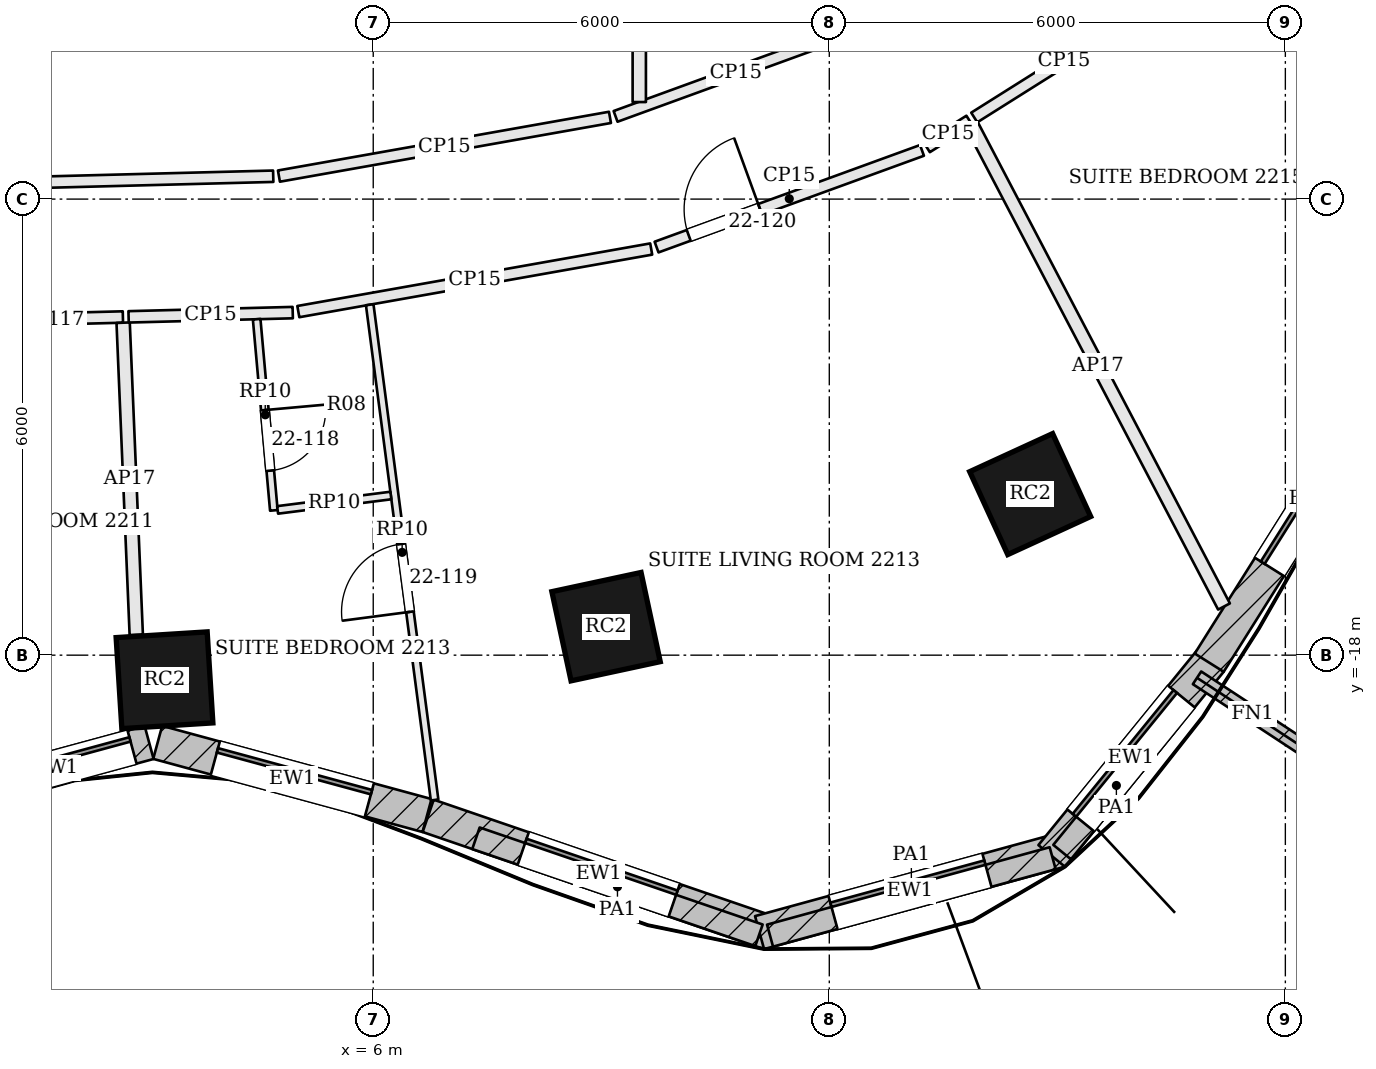
"""IFC4 building model, lengths in metres.
Left out: names, types, materials, properties, quantities, classifications, styles, units other than length and angle.
Written with IfcOpenShell. Run it as: python <this file> out.ifc"""

import sys

from ifc_helpers import new_model, si_unit, direction, frame, frame_2d, origin, origin_2d, place, context, subcontext, project, spatial, rectangle, extrude, element, fill, save


model = new_model("IFC4")
c1 = context("Model", 3, precision=1e-05, world=origin(), true_north=direction((0.0, 1.0)))
c2 = subcontext(c1, "Body", "Model", "MODEL_VIEW")
j1 = project(units=[si_unit("LENGTHUNIT", "METRE"), si_unit("PLANEANGLEUNIT", "RADIAN")], contexts=[c1])
p1 = place(None, origin())
s1 = spatial("IfcSite", under=j1, at=p1, CompositionType="ELEMENT")
p2 = place(p1, origin())
s2 = spatial("IfcBuilding", under=s1, at=p2, CompositionType="ELEMENT")
p3 = place(p2, frame((0.0, 0.0, 96.0)))
s3 = spatial("IfcBuildingStorey", under=s2, at=p3, CompositionType="ELEMENT", Elevation=96.0)
for number, where, z_axis, x_axis in (
    (1, (3.254, -18.33, 0.0), (0.0, 0.0, 1.0), (0.998, 0.063, 0.0)),
    (2, (9.063, -17.625, 0.0), (0.0, 0.0, 1.0), (0.978, 0.21, 0.0)),
    (3, (14.643, -15.881, 0.0), (0.0, 0.0, 1.0), (0.909, 0.417, 0.0)),
):
    element("IfcColumn", number, at=place(p3, frame(where, z_axis=z_axis, x_axis=x_axis)), inside=s3, PredefinedType="COLUMN", context=c2, shape_type="SweptSolid", body=[
        extrude(rectangle(XDim=1.2, YDim=1.2, at=origin_2d()), origin(), (0.0, 0.0, 1.0), 3.6),
    ])
p4 = place(p3, frame((0.576, -19.821, 0.0), z_axis=(0.0, 0.0, 1.0), x_axis=(0.965009398019, 0.262215296532, 0.0)))
e4 = element("IfcWall", 4, at=p4, inside=s3, PredefinedType="SOLIDWALL", context=c2, shape_type="SweptSolid", body=[
    extrude(rectangle(XDim=2.565, YDim=0.45, at=frame_2d((1.283, 0.0))), origin(), (0.0, 0.0, 1.0), 3.4),
])
p5 = place(p4, frame((0.233, 0.0, 0.9)))
e5 = element("IfcOpeningElement", 5, at=p5, cuts=e4, PredefinedType="OPENING", context=c2, shape_type="SweptSolid", body=[
    extrude(rectangle(XDim=2.1, YDim=2.0, at=frame_2d((1.05, 1.0))), frame((0.0, 0.235, 0.0), z_axis=(0.0, -1.0, 0.0), x_axis=(1.0, 0.0, 0.0)), (0.0, 0.0, 1.0), 0.47),
])
p6 = place(p3, frame((3.164, -19.147, 0.0), z_axis=(0.0, 0.0, 1.0), x_axis=(0.965039479998, -0.262104563191, 0.0)))
e6 = element("IfcWall", 6, at=p6, inside=s3, PredefinedType="SOLIDWALL", context=c2, shape_type="SweptSolid", body=[
    extrude(rectangle(XDim=3.672, YDim=0.45, at=frame_2d((1.836, 0.0))), origin(), (0.0, 0.0, 1.0), 3.4),
])
p7 = place(p6, frame((0.786, 0.0, 0.9)))
e7 = element("IfcOpeningElement", 7, at=p7, cuts=e6, PredefinedType="OPENING", context=c2, shape_type="SweptSolid", body=[
    extrude(rectangle(XDim=2.1, YDim=2.0, at=frame_2d((1.05, 1.0))), frame((0.0, 0.235, 0.0), z_axis=(0.0, -1.0, 0.0), x_axis=(1.0, 0.0, 0.0)), (0.0, 0.0, 1.0), 0.47),
])
p8 = place(p3, frame((6.723, -20.114, 0.0), z_axis=(0.0, 0.0, 1.0), x_axis=(0.945947299026, -0.324320377815, 0.0)))
e8 = element("IfcWall", 8, at=p8, inside=s3, PredefinedType="SOLIDWALL", context=c2, shape_type="SweptSolid", body=[
    extrude(rectangle(XDim=4.745, YDim=0.45, at=frame_2d((2.372, 0.0))), origin(), (0.0, 0.0, 1.0), 3.4),
])
p9 = place(p8, frame((1.322, 0.0, 0.9)))
e9 = element("IfcOpeningElement", 9, at=p9, cuts=e8, PredefinedType="OPENING", context=c2, shape_type="SweptSolid", body=[
    extrude(rectangle(XDim=2.1, YDim=2.0, at=frame_2d((1.05, 1.0))), frame((0.0, 0.235, 0.0), z_axis=(0.0, -1.0, 0.0), x_axis=(1.0, 0.0, 0.0)), (0.0, 0.0, 1.0), 0.47),
])
p10 = place(p3, frame((11.083, -21.65, 0.0), z_axis=(0.0, 0.0, 1.0), x_axis=(0.964483204983, 0.264144179011, 0.0)))
e10 = element("IfcWall", 10, at=p10, inside=s3, PredefinedType="SOLIDWALL", context=c2, shape_type="SweptSolid", body=[
    extrude(rectangle(XDim=4.104, YDim=0.45, at=frame_2d((2.052, 0.0))), origin(), (0.0, 0.0, 1.0), 3.4),
])
p11 = place(p10, frame((1.002, 0.0, 0.9)))
e11 = element("IfcOpeningElement", 11, at=p11, cuts=e10, PredefinedType="OPENING", context=c2, shape_type="SweptSolid", body=[
    extrude(rectangle(XDim=2.1, YDim=2.0, at=frame_2d((1.05, 1.0))), frame((0.0, 0.235, 0.0), z_axis=(0.0, -1.0, 0.0), x_axis=(1.0, 0.0, 0.0)), (0.0, 0.0, 1.0), 0.47),
])
p12 = place(p3, frame((14.926, -20.641, 0.0), z_axis=(0.0, 0.0, 1.0), x_axis=(0.631548074669, 0.775336720001, 0.0)))
e12 = element("IfcWall", 12, at=p12, inside=s3, PredefinedType="SOLIDWALL", context=c2, shape_type="SweptSolid", body=[
    extrude(rectangle(XDim=3.308, YDim=0.45, at=frame_2d((1.654, 0.0))), origin(), (0.0, 0.0, 1.0), 3.4),
])
p13 = place(p12, frame((0.604, 0.0, 0.9)))
e13 = element("IfcOpeningElement", 13, at=p13, cuts=e12, PredefinedType="OPENING", context=c2, shape_type="SweptSolid", body=[
    extrude(rectangle(XDim=2.1, YDim=2.0, at=frame_2d((1.05, 1.0))), frame((0.0, 0.235, 0.0), z_axis=(0.0, -1.0, 0.0), x_axis=(1.0, 0.0, 0.0)), (0.0, 0.0, 1.0), 0.47),
])
p14 = place(p3, frame((16.998, -18.099, 0.0), z_axis=(0.0, 0.0, 1.0), x_axis=(0.532745661304, 0.846275404559, 0.0)))
e14 = element("IfcWall", 14, at=p14, inside=s3, PredefinedType="SOLIDWALL", context=c2, shape_type="SweptSolid", body=[
    extrude(rectangle(XDim=5.076, YDim=0.45, at=frame_2d((2.538, 0.0))), origin(), (0.0, 0.0, 1.0), 3.4),
])
p15 = place(p14, frame((1.488, 0.0, 0.9)))
e15 = element("IfcOpeningElement", 15, at=p15, cuts=e14, PredefinedType="OPENING", context=c2, shape_type="SweptSolid", body=[
    extrude(rectangle(XDim=2.1, YDim=2.0, at=frame_2d((1.05, 1.0))), frame((0.0, 0.235, 0.0), z_axis=(0.0, -1.0, 0.0), x_axis=(1.0, 0.0, 0.0)), (0.0, 0.0, 1.0), 0.47),
])
p16 = place(p3, frame((16.838, -18.298, 0.0), z_axis=(0.0, 0.0, 1.0), x_axis=(0.835871900419, -0.548924554097, 0.0)))
e16 = element("IfcWall", 16, at=p16, inside=s3, PredefinedType="SOLIDWALL", context=c2, shape_type="SweptSolid", body=[
    extrude(rectangle(XDim=1.75, YDim=0.2, at=frame_2d((0.875, 0.0))), origin(), (0.0, 0.0, 1.0), 3.4),
])
p17 = place(p3, frame((7.352, -20.409, 3.6), z_axis=(0.0, 0.0, 1.0), x_axis=(0.945937789937, -0.32434811171, 0.0)))
e17 = element("IfcWall", 17, at=p17, inside=s3, PredefinedType="PARAPET", context=c2, shape_type="SweptSolid", body=[
    extrude(rectangle(XDim=3.936, YDim=0.3, at=frame_2d((1.968, 0.0))), origin(), (0.0, 0.0, 1.0), 1.1),
])
p18 = place(p3, frame((11.22, -21.69, 3.6), z_axis=(0.0, 0.0, 1.0), x_axis=(0.964484148392, 0.264140734271, 0.0)))
e18 = element("IfcWall", 18, at=p18, inside=s3, PredefinedType="PARAPET", context=c2, shape_type="SweptSolid", body=[
    extrude(rectangle(XDim=3.855, YDim=0.3, at=frame_2d((1.928, 0.0))), origin(), (0.0, 0.0, 1.0), 1.1),
])
p19 = place(p3, frame((15.063, -20.591, 3.6), z_axis=(0.0, 0.0, 1.0), x_axis=(0.631559943447, 0.775327052174, 0.0)))
e19 = element("IfcWall", 19, at=p19, inside=s3, PredefinedType="PARAPET", context=c2, shape_type="SweptSolid", body=[
    extrude(rectangle(XDim=2.26, YDim=0.3, at=frame_2d((1.13, 0.0))), origin(), (0.0, 0.0, 1.0), 1.1),
])
p20 = place(p3, frame((-1.957, -13.672, 0.0), z_axis=(0.0, 0.0, 1.0), x_axis=(0.999664413823, 0.025904820691, 0.0)))
e20 = element("IfcWall", 20, at=p20, inside=s3, PredefinedType="PARTITIONING", context=c2, shape_type="SweptSolid", body=[
    extrude(rectangle(XDim=4.665, YDim=0.15, at=frame_2d((2.333, 0.0))), origin(), (0.0, 0.0, 1.0), 2.784),
])
p21 = place(p20, frame((2.712, 0.0, 0.0)))
e21 = element("IfcOpeningElement", 21, at=p21, cuts=e20, PredefinedType="OPENING", context=c2, shape_type="SweptSolid", body=[
    extrude(rectangle(XDim=1.0, YDim=2.1, at=frame_2d((0.5, 1.05))), frame((0.0, 0.085, 0.0), z_axis=(0.0, -1.0, 0.0), x_axis=(1.0, 0.0, 0.0)), (0.0, 0.0, 1.0), 0.17),
])
p22 = place(p3, frame((2.882, -17.732, 0.0), z_axis=(0.0, 0.0, 1.0), x_axis=(-0.042001196053, 0.999117560415, 0.0)))
e22 = element("IfcWall", 22, at=p22, inside=s3, PredefinedType="PARTITIONING", context=c2, shape_type="SweptSolid", body=[
    extrude(rectangle(XDim=4.11, YDim=0.175, at=frame_2d((2.055, 0.0))), origin(), (0.0, 0.0, 1.0), 2.784),
])
p23 = place(p3, frame((2.781, -13.549, 0.0), z_axis=(0.0, 0.0, 1.0), x_axis=(0.999665013714, 0.025881660615, 0.0)))
e23 = element("IfcWall", 23, at=p23, inside=s3, PredefinedType="PARTITIONING", context=c2, shape_type="SweptSolid", body=[
    extrude(rectangle(XDim=2.16, YDim=0.15, at=frame_2d((1.08, 0.0))), origin(), (0.0, 0.0, 1.0), 2.784),
])
p24 = place(p3, frame((5.015, -13.48, 0.0), z_axis=(0.0, 0.0, 1.0), x_axis=(0.984637772103, 0.174609443467, 0.0)))
e24 = element("IfcWall", 24, at=p24, inside=s3, PredefinedType="PARTITIONING", context=c2, shape_type="SweptSolid", body=[
    extrude(rectangle(XDim=4.715, YDim=0.15, at=frame_2d((2.357, 0.0))), origin(), (0.0, 0.0, 1.0), 2.784),
])
p25 = place(p3, frame((9.728, -12.631, 0.0), z_axis=(0.0, 0.0, 1.0), x_axis=(0.939626438181, 0.342201923826, 0.0)))
e25 = element("IfcWall", 25, at=p25, inside=s3, PredefinedType="PARTITIONING", context=c2, shape_type="SweptSolid", body=[
    extrude(rectangle(XDim=3.716, YDim=0.15, at=frame_2d((1.858, 0.0))), origin(), (0.0, 0.0, 1.0), 2.784),
])
p26 = place(p25, frame((0.45, 0.0, 0.0)))
e26 = element("IfcOpeningElement", 26, at=p26, cuts=e25, PredefinedType="OPENING", context=c2, shape_type="SweptSolid", body=[
    extrude(rectangle(XDim=1.0, YDim=2.1, at=frame_2d((0.5, 1.05))), frame((0.0, 0.085, 0.0), z_axis=(0.0, -1.0, 0.0), x_axis=(1.0, 0.0, 0.0)), (0.0, 0.0, 1.0), 0.17),
])
p27 = place(p3, frame((13.283, -11.319, 0.0), z_axis=(0.0, 0.0, 1.0), x_axis=(0.846275904875, 0.532744866543, 0.0)))
e27 = element("IfcWall", 27, at=p27, inside=s3, PredefinedType="PARTITIONING", context=c2, shape_type="SweptSolid", body=[
    extrude(rectangle(XDim=0.663, YDim=0.15, at=frame_2d((0.331, 0.0))), origin(), (0.0, 0.0, 1.0), 2.784),
])
p28 = place(p3, frame((17.193, -17.36, 0.0), z_axis=(0.0, 0.0, 1.0), x_axis=(-0.464005717448, 0.8858322043, 0.0)))
e28 = element("IfcWall", 28, at=p28, inside=s3, PredefinedType="PARTITIONING", context=c2, shape_type="SweptSolid", body=[
    extrude(rectangle(XDim=7.143, YDim=0.175, at=frame_2d((3.571, 0.0))), origin(), (0.0, 0.0, 1.0), 2.784),
])
p29 = place(p3, frame((13.907, -10.927, 0.0), z_axis=(0.0, 0.0, 1.0), x_axis=(0.846289768331, 0.53272284353, 0.0)))
e29 = element("IfcWall", 29, at=p29, inside=s3, PredefinedType="PARTITIONING", context=c2, shape_type="SweptSolid", body=[
    extrude(rectangle(XDim=2.793, YDim=0.15, at=frame_2d((1.396, 0.0))), origin(), (0.0, 0.0, 1.0), 2.784),
])
p30 = place(p3, frame((12.353, -9.76, 0.0), z_axis=(0.0, 0.0, 1.0), x_axis=(-0.939632450309, -0.342185415127, 0.0)))
e30 = element("IfcWall", 30, at=p30, inside=s3, PredefinedType="PARTITIONING", context=c2, shape_type="SweptSolid", body=[
    extrude(rectangle(XDim=3.368, YDim=0.15, at=frame_2d((1.684, 0.0))), origin(), (0.0, 0.0, 1.0), 2.784),
])
p31 = place(p3, frame((9.115, -10.925, 0.0), z_axis=(0.0, 0.0, 1.0), x_axis=(-0.984632605417, -0.174638576352, 0.0)))
e31 = element("IfcWall", 31, at=p31, inside=s3, PredefinedType="PARTITIONING", context=c2, shape_type="SweptSolid", body=[
    extrude(rectangle(XDim=4.423, YDim=0.15, at=frame_2d((2.211, 0.0))), origin(), (0.0, 0.0, 1.0), 2.784),
])
p32 = place(p3, frame((4.684, -11.699, 0.0), z_axis=(0.0, 0.0, 1.0), x_axis=(-0.999663438204, -0.025942442425, 0.0)))
e32 = element("IfcWall", 32, at=p32, inside=s3, PredefinedType="PARTITIONING", context=c2, shape_type="SweptSolid", body=[
    extrude(rectangle(XDim=6.663, YDim=0.15, at=frame_2d((3.332, 0.0))), origin(), (0.0, 0.0, 1.0), 2.784),
])
p33 = place(p3, frame((6.807, -19.905, 0.0), z_axis=(0.0, 0.0, 1.0), x_axis=(-0.129895112789, 0.991527740244, 0.0)))
e33 = element("IfcWall", 33, at=p33, inside=s3, PredefinedType="PARTITIONING", context=c2, shape_type="SweptSolid", body=[
    extrude(rectangle(XDim=6.571, YDim=0.1, at=frame_2d((3.285, 0.0))), origin(), (0.0, 0.0, 1.0), 2.884),
])
p34 = place(p33, frame((2.496, 0.0, 0.0)))
e34 = element("IfcOpeningElement", 34, at=p34, cuts=e33, PredefinedType="OPENING", context=c2, shape_type="SweptSolid", body=[
    extrude(rectangle(XDim=0.9, YDim=2.4, at=frame_2d((0.45, 1.2))), frame((0.0, 0.06, 0.0), z_axis=(0.0, -1.0, 0.0), x_axis=(1.0, 0.0, 0.0)), (0.0, 0.0, 1.0), 0.12),
])
p35 = place(p3, frame((4.466, -13.581, 0.0), z_axis=(0.0, 0.0, 1.0), x_axis=(0.089541778651, -0.995983067063, 0.0)))
e35 = element("IfcWall", 35, at=p35, inside=s3, PredefinedType="PARTITIONING", context=c2, shape_type="SweptSolid", body=[
    extrude(rectangle(XDim=2.525, YDim=0.1, at=frame_2d((1.262, 0.0))), origin(), (0.0, 0.0, 1.0), 2.884),
])
p36 = place(p35, frame((1.2, 0.0, 0.0)))
e36 = element("IfcOpeningElement", 36, at=p36, cuts=e35, PredefinedType="OPENING", context=c2, shape_type="SweptSolid", body=[
    extrude(rectangle(XDim=0.8, YDim=2.1, at=frame_2d((0.4, 1.05))), frame((0.0, 0.06, 0.0), z_axis=(0.0, -1.0, 0.0), x_axis=(1.0, 0.0, 0.0)), (0.0, 0.0, 1.0), 0.12),
])
p37 = place(p3, frame((4.742, -16.089, 0.0), z_axis=(0.0, 0.0, 1.0), x_axis=(0.992013080374, 0.126135040205, 0.0)))
e37 = element("IfcWall", 37, at=p37, inside=s3, PredefinedType="PARTITIONING", context=c2, shape_type="SweptSolid", body=[
    extrude(rectangle(XDim=1.502, YDim=0.1, at=frame_2d((0.751, 0.0))), origin(), (0.0, 0.0, 1.0), 2.884),
])
p38 = place(p3, frame((23.256, -11.501, 0.0), z_axis=(0.0, 0.0, 1.0), x_axis=(-0.802700401869, 0.596382482003, 0.0)))
e38 = element("IfcWall", 38, at=p38, inside=s3, PredefinedType="PARTITIONING", context=c2, shape_type="SweptSolid", body=[
    extrude(rectangle(XDim=6.533, YDim=0.1, at=frame_2d((3.267, 0.0))), origin(), (0.0, 0.0, 1.0), 2.884),
])
p39 = place(p38, frame((2.458, 0.0, 0.0)))
e39 = element("IfcOpeningElement", 39, at=p39, cuts=e38, PredefinedType="OPENING", context=c2, shape_type="SweptSolid", body=[
    extrude(rectangle(XDim=0.9, YDim=2.4, at=frame_2d((0.45, 1.2))), frame((0.0, 0.06, 0.0), z_axis=(0.0, -1.0, 0.0), x_axis=(1.0, 0.0, 0.0)), (0.0, 0.0, 1.0), 0.12),
])
p40 = place(p3, frame((17.006, -8.73, 0.0), z_axis=(0.0, 0.0, 1.0), x_axis=(0.722927369978, -0.690924031813, 0.0)))
e40 = element("IfcWall", 40, at=p40, inside=s3, PredefinedType="PARTITIONING", context=c2, shape_type="SweptSolid", body=[
    extrude(rectangle(XDim=2.525, YDim=0.1, at=frame_2d((1.263, 0.0))), origin(), (0.0, 0.0, 1.0), 2.884),
])
p41 = place(p40, frame((1.2, 0.0, 0.0)))
e41 = element("IfcOpeningElement", 41, at=p41, cuts=e40, PredefinedType="OPENING", context=c2, shape_type="SweptSolid", body=[
    extrude(rectangle(XDim=0.8, YDim=2.1, at=frame_2d((0.4, 1.05))), frame((0.0, 0.06, 0.0), z_axis=(0.0, -1.0, 0.0), x_axis=(1.0, 0.0, 0.0)), (0.0, 0.0, 1.0), 0.12),
])
p42 = place(p3, frame((9.5, -10.723, 0.0), z_axis=(0.0, 0.0, 1.0), x_axis=(0.0, 1.0, 0.0)))
e42 = element("IfcWall", 42, at=p42, inside=s3, PredefinedType="PARTITIONING", context=c2, shape_type="SweptSolid", body=[
    extrude(rectangle(XDim=5.848, YDim=0.175, at=frame_2d((2.924, 0.0))), origin(), (0.0, 0.0, 1.0), 2.784),
])
p43 = place(p5, origin())
e43 = element("IfcWindow", 43, at=p43, inside=s3, PartitioningType="SINGLE_PANEL", PredefinedType="WINDOW", context=c2, shape_type="SweptSolid", body=[
    extrude(rectangle(XDim=2.1, YDim=2.0, at=frame_2d((1.05, 1.0))), frame((0.0, 0.135, 0.0), z_axis=(0.0, -1.0, 0.0), x_axis=(1.0, 0.0, 0.0)), (0.0, 0.0, 1.0), 0.06),
])
fill(e5, e43)
p44 = place(p7, origin())
e44 = element("IfcWindow", 44, at=p44, inside=s3, PartitioningType="SINGLE_PANEL", PredefinedType="WINDOW", context=c2, shape_type="SweptSolid", body=[
    extrude(rectangle(XDim=2.1, YDim=2.0, at=frame_2d((1.05, 1.0))), frame((0.0, 0.135, 0.0), z_axis=(0.0, -1.0, 0.0), x_axis=(1.0, 0.0, 0.0)), (0.0, 0.0, 1.0), 0.06),
])
fill(e7, e44)
p45 = place(p9, origin())
e45 = element("IfcWindow", 45, at=p45, inside=s3, PartitioningType="SINGLE_PANEL", PredefinedType="WINDOW", context=c2, shape_type="SweptSolid", body=[
    extrude(rectangle(XDim=2.1, YDim=2.0, at=frame_2d((1.05, 1.0))), frame((0.0, 0.135, 0.0), z_axis=(0.0, -1.0, 0.0), x_axis=(1.0, 0.0, 0.0)), (0.0, 0.0, 1.0), 0.06),
])
fill(e9, e45)
p46 = place(p11, origin())
e46 = element("IfcWindow", 46, at=p46, inside=s3, PartitioningType="SINGLE_PANEL", PredefinedType="WINDOW", context=c2, shape_type="SweptSolid", body=[
    extrude(rectangle(XDim=2.1, YDim=2.0, at=frame_2d((1.05, 1.0))), frame((0.0, 0.135, 0.0), z_axis=(0.0, -1.0, 0.0), x_axis=(1.0, 0.0, 0.0)), (0.0, 0.0, 1.0), 0.06),
])
fill(e11, e46)
p47 = place(p13, origin())
e47 = element("IfcWindow", 47, at=p47, inside=s3, PartitioningType="SINGLE_PANEL", PredefinedType="WINDOW", context=c2, shape_type="SweptSolid", body=[
    extrude(rectangle(XDim=2.1, YDim=2.0, at=frame_2d((1.05, 1.0))), frame((0.0, 0.135, 0.0), z_axis=(0.0, -1.0, 0.0), x_axis=(1.0, 0.0, 0.0)), (0.0, 0.0, 1.0), 0.06),
])
fill(e13, e47)
p48 = place(p15, origin())
e48 = element("IfcWindow", 48, at=p48, inside=s3, PartitioningType="SINGLE_PANEL", PredefinedType="WINDOW", context=c2, shape_type="SweptSolid", body=[
    extrude(rectangle(XDim=2.1, YDim=2.0, at=frame_2d((1.05, 1.0))), frame((0.0, 0.135, 0.0), z_axis=(0.0, -1.0, 0.0), x_axis=(1.0, 0.0, 0.0)), (0.0, 0.0, 1.0), 0.06),
])
fill(e15, e48)
p49 = place(p36, origin())
e49 = element("IfcDoor", 49, at=p49, inside=s3, OperationType="SINGLE_SWING_LEFT", PredefinedType="DOOR", context=c2, shape_type="SweptSolid", body=[
    extrude(rectangle(XDim=0.8, YDim=2.1, at=frame_2d((0.4, 1.05))), frame((0.0, 0.025, 0.0), z_axis=(0.0, -1.0, 0.0), x_axis=(1.0, 0.0, 0.0)), (0.0, 0.0, 1.0), 0.05),
])
fill(e36, e49)
p50 = place(p34, origin())
e50 = element("IfcDoor", 50, at=p50, inside=s3, OperationType="SINGLE_SWING_LEFT", PredefinedType="DOOR", context=c2, shape_type="SweptSolid", body=[
    extrude(rectangle(XDim=0.9, YDim=2.4, at=frame_2d((0.45, 1.2))), frame((0.0, 0.025, 0.0), z_axis=(0.0, -1.0, 0.0), x_axis=(1.0, 0.0, 0.0)), (0.0, 0.0, 1.0), 0.05),
])
fill(e34, e50)
p51 = place(p26, origin())
e51 = element("IfcDoor", 51, at=p51, inside=s3, OperationType="SINGLE_SWING_RIGHT", PredefinedType="DOOR", context=c2, shape_type="SweptSolid", body=[
    extrude(rectangle(XDim=1.0, YDim=2.1, at=frame_2d((0.5, 1.05))), frame((0.0, 0.025, 0.0), z_axis=(0.0, -1.0, 0.0), x_axis=(1.0, 0.0, 0.0)), (0.0, 0.0, 1.0), 0.05),
])
fill(e26, e51)
p52 = place(p41, origin())
e52 = element("IfcDoor", 52, at=p52, inside=s3, OperationType="SINGLE_SWING_LEFT", PredefinedType="DOOR", context=c2, shape_type="SweptSolid", body=[
    extrude(rectangle(XDim=0.8, YDim=2.1, at=frame_2d((0.4, 1.05))), frame((0.0, 0.025, 0.0), z_axis=(0.0, -1.0, 0.0), x_axis=(1.0, 0.0, 0.0)), (0.0, 0.0, 1.0), 0.05),
])
fill(e41, e52)
save(model, sys.argv[1])
